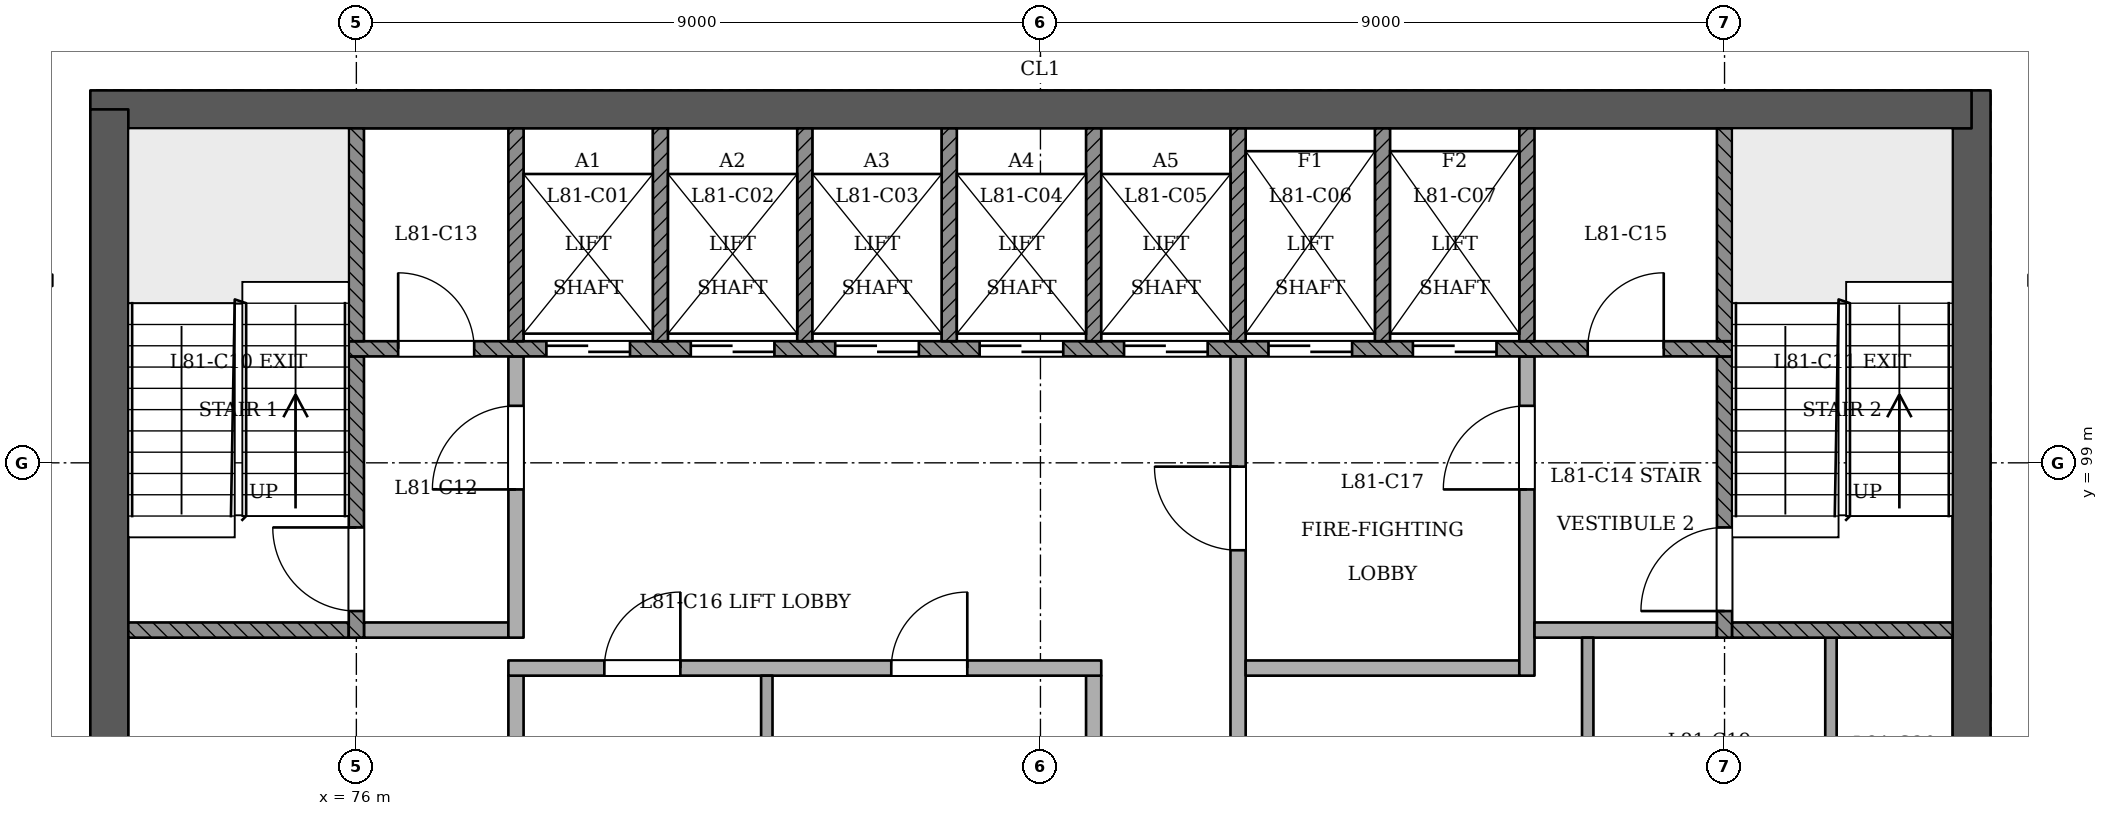
"""IFC4 building model, lengths in metres.
Left out: names, types, materials, properties, quantities, classifications, styles, units other than length and angle.
Written with IfcOpenShell. Run it as: python <this file> out.ifc"""

import sys

from ifc_helpers import new_model, si_unit, direction, frame, frame_2d, origin, place, context, subcontext, project, spatial, rectangle, extrude, element, fill, save


model = new_model("IFC4")
c1 = context("Model", 3, precision=1e-05, world=origin(), true_north=direction((0.0, 1.0)))
c2 = subcontext(c1, "Body", "Model", "MODEL_VIEW")
j1 = project(units=[si_unit("LENGTHUNIT", "METRE"), si_unit("PLANEANGLEUNIT", "RADIAN")], contexts=[c1])
p1 = place(None, origin())
s1 = spatial("IfcSite", under=j1, at=p1, CompositionType="ELEMENT")
p2 = place(p1, origin())
s2 = spatial("IfcBuilding", under=s1, at=p2, CompositionType="ELEMENT")
p3 = place(p2, frame((0.0, 0.0, 313.0)))
s3 = spatial("IfcBuildingStorey", under=s2, at=p3, CompositionType="ELEMENT", Elevation=313.0)
p4 = place(p3, frame((97.25, 93.15, 0.0), z_axis=(0.0, 0.0, 1.0), x_axis=(0.0, 1.0, 0.0)))
e1 = element("IfcWall", 1, at=p4, inside=s3, PredefinedType="SHEAR", context=c2, shape_type="SweptSolid", body=[
    extrude(rectangle(XDim=10.75, YDim=0.5, at=frame_2d((5.375, 0.0))), origin(), (0.0, 0.0, 1.0), 3.6),
])
p5 = place(p3, frame((97.25, 103.65, 0.0), z_axis=(0.0, 0.0, 1.0), x_axis=(-1.0, 0.0, 0.0)))
e2 = element("IfcWall", 2, at=p5, inside=s3, PredefinedType="SHEAR", context=c2, shape_type="SweptSolid", body=[
    extrude(rectangle(XDim=24.75, YDim=0.5, at=frame_2d((12.375, 0.0))), origin(), (0.0, 0.0, 1.0), 3.6),
])
p6 = place(p3, frame((72.75, 103.65, 0.0), z_axis=(0.0, 0.0, 1.0), x_axis=(0.0, -1.0, 0.0)))
e3 = element("IfcWall", 3, at=p6, inside=s3, PredefinedType="SHEAR", context=c2, shape_type="SweptSolid", body=[
    extrude(rectangle(XDim=10.75, YDim=0.5, at=frame_2d((5.375, 0.0))), origin(), (0.0, 0.0, 1.0), 3.6),
])
p7 = place(p3, frame((78.1, 93.4, 0.0), z_axis=(0.0, 0.0, 1.0), x_axis=(0.0, 1.0, 0.0)))
e4 = element("IfcWall", 4, at=p7, inside=s3, PredefinedType="PARTITIONING", context=c2, shape_type="SweptSolid", body=[
    extrude(rectangle(XDim=2.8, YDim=0.2, at=frame_2d((1.4, 0.0))), origin(), (0.0, 0.0, 1.0), 3.2),
])
p8 = place(p3, frame((81.4, 93.4, 0.0), z_axis=(0.0, 0.0, 1.0), x_axis=(0.0, 1.0, 0.0)))
e5 = element("IfcWall", 5, at=p8, inside=s3, PredefinedType="PARTITIONING", context=c2, shape_type="SweptSolid", body=[
    extrude(rectangle(XDim=2.8, YDim=0.15, at=frame_2d((1.4, 0.0))), origin(), (0.0, 0.0, 1.0), 3.2),
])
p9 = place(p3, frame((85.7, 93.4, 0.0), z_axis=(0.0, 0.0, 1.0), x_axis=(0.0, 1.0, 0.0)))
e6 = element("IfcWall", 6, at=p9, inside=s3, PredefinedType="PARTITIONING", context=c2, shape_type="SweptSolid", body=[
    extrude(rectangle(XDim=2.8, YDim=0.2, at=frame_2d((1.4, 0.0))), origin(), (0.0, 0.0, 1.0), 3.2),
])
p10 = place(p3, frame((87.6, 93.4, 0.0), z_axis=(0.0, 0.0, 1.0), x_axis=(0.0, 1.0, 0.0)))
e7 = element("IfcWall", 7, at=p10, inside=s3, PredefinedType="PARTITIONING", context=c2, shape_type="SweptSolid", body=[
    extrude(rectangle(XDim=7.0, YDim=0.2, at=frame_2d((3.5, 0.0))), origin(), (0.0, 0.0, 1.0), 3.2),
])
p11 = place(p10, frame((4.45, 0.0, 0.0)))
e8 = element("IfcOpeningElement", 8, at=p11, cuts=e7, PredefinedType="OPENING", context=c2, shape_type="SweptSolid", body=[
    extrude(rectangle(XDim=1.1, YDim=2.1, at=frame_2d((0.55, 1.05))), frame((0.0, 0.11, 0.0), z_axis=(0.0, -1.0, 0.0), x_axis=(1.0, 0.0, 0.0)), (0.0, 0.0, 1.0), 0.221),
])
for number, where, z_axis, x_axis in (
    (9, (92.2, 93.4, 0.0), (0.0, 0.0, 1.0), (0.0, 1.0, 0.0)),
    (10, (95.4, 93.4, 0.0), (0.0, 0.0, 1.0), (0.0, 1.0, 0.0)),
):
    element("IfcWall", number, at=place(p3, frame(where, z_axis=z_axis, x_axis=x_axis)), inside=s3, PredefinedType="PARTITIONING", context=c2, shape_type="SweptSolid", body=[
        extrude(rectangle(XDim=3.3, YDim=0.15, at=frame_2d((1.65, 0.0))), origin(), (0.0, 0.0, 1.0), 3.2),
    ])
p12 = place(p3, frame((78.0, 96.3, 0.0), z_axis=(0.0, 0.0, 1.0), x_axis=(1.0, 0.0, 0.0)))
e11 = element("IfcWall", 11, at=p12, inside=s3, PredefinedType="PARTITIONING", context=c2, shape_type="SweptSolid", body=[
    extrude(rectangle(XDim=7.8, YDim=0.2, at=frame_2d((3.9, 0.0))), origin(), (0.0, 0.0, 1.0), 3.2),
])
p13 = place(p12, frame((1.262, 0.0, 0.0)))
e12 = element("IfcOpeningElement", 12, at=p13, cuts=e11, PredefinedType="OPENING", context=c2, shape_type="SweptSolid", body=[
    extrude(rectangle(XDim=1.0, YDim=2.1, at=frame_2d((0.5, 1.05))), frame((0.0, 0.11, 0.0), z_axis=(0.0, -1.0, 0.0), x_axis=(1.0, 0.0, 0.0)), (0.0, 0.0, 1.0), 0.221),
])
p14 = place(p12, frame((5.038, 0.0, 0.0)))
e13 = element("IfcOpeningElement", 13, at=p14, cuts=e11, PredefinedType="OPENING", context=c2, shape_type="SweptSolid", body=[
    extrude(rectangle(XDim=1.0, YDim=2.1, at=frame_2d((0.5, 1.05))), frame((0.0, 0.11, 0.0), z_axis=(0.0, -1.0, 0.0), x_axis=(1.0, 0.0, 0.0)), (0.0, 0.0, 1.0), 0.221),
])
p15 = place(p3, frame((87.7, 96.3, 0.0), z_axis=(0.0, 0.0, 1.0), x_axis=(1.0, 0.0, 0.0)))
e14 = element("IfcWall", 14, at=p15, inside=s3, PredefinedType="PARTITIONING", context=c2, shape_type="SweptSolid", body=[
    extrude(rectangle(XDim=3.6, YDim=0.2, at=frame_2d((1.8, 0.0))), origin(), (0.0, 0.0, 1.0), 3.2),
])
p16 = place(p3, frame((91.4, 96.2, 0.0), z_axis=(0.0, 0.0, 1.0), x_axis=(0.0, 1.0, 0.0)))
e15 = element("IfcWall", 15, at=p16, inside=s3, PredefinedType="PARTITIONING", context=c2, shape_type="SweptSolid", body=[
    extrude(rectangle(XDim=4.2, YDim=0.2, at=frame_2d((2.1, 0.0))), origin(), (0.0, 0.0, 1.0), 3.2),
])
p17 = place(p16, frame((2.45, 0.0, 0.0)))
e16 = element("IfcOpeningElement", 16, at=p17, cuts=e15, PredefinedType="OPENING", context=c2, shape_type="SweptSolid", body=[
    extrude(rectangle(XDim=1.1, YDim=2.1, at=frame_2d((0.55, 1.05))), frame((0.0, 0.11, 0.0), z_axis=(0.0, -1.0, 0.0), x_axis=(1.0, 0.0, 0.0)), (0.0, 0.0, 1.0), 0.221),
])
p18 = place(p3, frame((73.0, 96.8, 0.0), z_axis=(0.0, 0.0, 1.0), x_axis=(1.0, 0.0, 0.0)))
e17 = element("IfcWall", 17, at=p18, inside=s3, PredefinedType="SOLIDWALL", context=c2, shape_type="SweptSolid", body=[
    extrude(rectangle(XDim=2.9, YDim=0.2, at=frame_2d((1.45, 0.0))), origin(), (0.0, 0.0, 1.0), 3.2),
])
p19 = place(p3, frame((76.0, 96.7, 0.0), z_axis=(0.0, 0.0, 1.0), x_axis=(0.0, 1.0, 0.0)))
e18 = element("IfcWall", 18, at=p19, inside=s3, PredefinedType="SOLIDWALL", context=c2, shape_type="SweptSolid", body=[
    extrude(rectangle(XDim=3.7, YDim=0.2, at=frame_2d((1.85, 0.0))), origin(), (0.0, 0.0, 1.0), 3.2),
])
p20 = place(p19, frame((0.35, 0.0, 0.0)))
e19 = element("IfcOpeningElement", 19, at=p20, cuts=e18, PredefinedType="OPENING", context=c2, shape_type="SweptSolid", body=[
    extrude(rectangle(XDim=1.1, YDim=2.1, at=frame_2d((0.55, 1.05))), frame((0.0, 0.11, 0.0), z_axis=(0.0, -1.0, 0.0), x_axis=(1.0, 0.0, 0.0)), (0.0, 0.0, 1.0), 0.221),
])
p21 = place(p3, frame((76.1, 96.8, 0.0), z_axis=(0.0, 0.0, 1.0), x_axis=(1.0, 0.0, 0.0)))
e20 = element("IfcWall", 20, at=p21, inside=s3, PredefinedType="PARTITIONING", context=c2, shape_type="SweptSolid", body=[
    extrude(rectangle(XDim=1.9, YDim=0.2, at=frame_2d((0.95, 0.0))), origin(), (0.0, 0.0, 1.0), 3.2),
])
p22 = place(p3, frame((78.1, 96.7, 0.0), z_axis=(0.0, 0.0, 1.0), x_axis=(0.0, 1.0, 0.0)))
e21 = element("IfcWall", 21, at=p22, inside=s3, PredefinedType="PARTITIONING", context=c2, shape_type="SweptSolid", body=[
    extrude(rectangle(XDim=3.7, YDim=0.2, at=frame_2d((1.85, 0.0))), origin(), (0.0, 0.0, 1.0), 3.2),
])
p23 = place(p22, frame((1.95, 0.0, 0.0)))
e22 = element("IfcOpeningElement", 22, at=p23, cuts=e21, PredefinedType="OPENING", context=c2, shape_type="SweptSolid", body=[
    extrude(rectangle(XDim=1.1, YDim=2.1, at=frame_2d((0.55, 1.05))), frame((0.0, 0.11, 0.0), z_axis=(0.0, -1.0, 0.0), x_axis=(1.0, 0.0, 0.0)), (0.0, 0.0, 1.0), 0.221),
])
p24 = place(p3, frame((91.5, 96.8, 0.0), z_axis=(0.0, 0.0, 1.0), x_axis=(1.0, 0.0, 0.0)))
e23 = element("IfcWall", 23, at=p24, inside=s3, PredefinedType="PARTITIONING", context=c2, shape_type="SweptSolid", body=[
    extrude(rectangle(XDim=2.4, YDim=0.2, at=frame_2d((1.2, 0.0))), origin(), (0.0, 0.0, 1.0), 3.2),
])
p25 = place(p3, frame((94.0, 96.7, 0.0), z_axis=(0.0, 0.0, 1.0), x_axis=(0.0, 1.0, 0.0)))
e24 = element("IfcWall", 24, at=p25, inside=s3, PredefinedType="SOLIDWALL", context=c2, shape_type="SweptSolid", body=[
    extrude(rectangle(XDim=3.7, YDim=0.2, at=frame_2d((1.85, 0.0))), origin(), (0.0, 0.0, 1.0), 3.2),
])
p26 = place(p25, frame((0.35, 0.0, 0.0)))
e25 = element("IfcOpeningElement", 25, at=p26, cuts=e24, PredefinedType="OPENING", context=c2, shape_type="SweptSolid", body=[
    extrude(rectangle(XDim=1.1, YDim=2.1, at=frame_2d((0.55, 1.05))), frame((0.0, 0.11, 0.0), z_axis=(0.0, -1.0, 0.0), x_axis=(1.0, 0.0, 0.0)), (0.0, 0.0, 1.0), 0.221),
])
p27 = place(p3, frame((94.1, 96.8, 0.0), z_axis=(0.0, 0.0, 1.0), x_axis=(1.0, 0.0, 0.0)))
e26 = element("IfcWall", 26, at=p27, inside=s3, PredefinedType="SOLIDWALL", context=c2, shape_type="SweptSolid", body=[
    extrude(rectangle(XDim=2.9, YDim=0.2, at=frame_2d((1.45, 0.0))), origin(), (0.0, 0.0, 1.0), 3.2),
])
p28 = place(p3, frame((75.9, 100.5, 0.0), z_axis=(0.0, 0.0, 1.0), x_axis=(1.0, 0.0, 0.0)))
e27 = element("IfcWall", 27, at=p28, inside=s3, PredefinedType="SOLIDWALL", context=c2, shape_type="SweptSolid", body=[
    extrude(rectangle(XDim=18.2, YDim=0.2, at=frame_2d((9.1, 0.0))), origin(), (0.0, 0.0, 1.0), 3.2),
])
p29 = place(p28, frame((2.6, 0.0, 0.0)))
e28 = element("IfcOpeningElement", 28, at=p29, cuts=e27, PredefinedType="OPENING", context=c2, shape_type="SweptSolid", body=[
    extrude(rectangle(XDim=1.1, YDim=2.1, at=frame_2d((0.55, 1.05))), frame((0.0, 0.11, 0.0), z_axis=(0.0, -1.0, 0.0), x_axis=(1.0, 0.0, 0.0)), (0.0, 0.0, 1.0), 0.221),
])
p30 = place(p28, frame((4.5, 0.0, 0.0)))
e29 = element("IfcOpeningElement", 29, at=p30, cuts=e27, PredefinedType="OPENING", context=c2, shape_type="SweptSolid", body=[
    extrude(rectangle(XDim=1.1, YDim=2.1, at=frame_2d((0.55, 1.05))), frame((0.0, 0.11, 0.0), z_axis=(0.0, -1.0, 0.0), x_axis=(1.0, 0.0, 0.0)), (0.0, 0.0, 1.0), 0.221),
])
p31 = place(p28, frame((6.4, 0.0, 0.0)))
e30 = element("IfcOpeningElement", 30, at=p31, cuts=e27, PredefinedType="OPENING", context=c2, shape_type="SweptSolid", body=[
    extrude(rectangle(XDim=1.1, YDim=2.1, at=frame_2d((0.55, 1.05))), frame((0.0, 0.11, 0.0), z_axis=(0.0, -1.0, 0.0), x_axis=(1.0, 0.0, 0.0)), (0.0, 0.0, 1.0), 0.221),
])
p32 = place(p28, frame((8.3, 0.0, 0.0)))
e31 = element("IfcOpeningElement", 31, at=p32, cuts=e27, PredefinedType="OPENING", context=c2, shape_type="SweptSolid", body=[
    extrude(rectangle(XDim=1.1, YDim=2.1, at=frame_2d((0.55, 1.05))), frame((0.0, 0.11, 0.0), z_axis=(0.0, -1.0, 0.0), x_axis=(1.0, 0.0, 0.0)), (0.0, 0.0, 1.0), 0.221),
])
p33 = place(p28, frame((10.2, 0.0, 0.0)))
e32 = element("IfcOpeningElement", 32, at=p33, cuts=e27, PredefinedType="OPENING", context=c2, shape_type="SweptSolid", body=[
    extrude(rectangle(XDim=1.1, YDim=2.1, at=frame_2d((0.55, 1.05))), frame((0.0, 0.11, 0.0), z_axis=(0.0, -1.0, 0.0), x_axis=(1.0, 0.0, 0.0)), (0.0, 0.0, 1.0), 0.221),
])
p34 = place(p28, frame((12.1, 0.0, 0.0)))
e33 = element("IfcOpeningElement", 33, at=p34, cuts=e27, PredefinedType="OPENING", context=c2, shape_type="SweptSolid", body=[
    extrude(rectangle(XDim=1.1, YDim=2.1, at=frame_2d((0.55, 1.05))), frame((0.0, 0.11, 0.0), z_axis=(0.0, -1.0, 0.0), x_axis=(1.0, 0.0, 0.0)), (0.0, 0.0, 1.0), 0.221),
])
p35 = place(p28, frame((14.0, 0.0, 0.0)))
e34 = element("IfcOpeningElement", 34, at=p35, cuts=e27, PredefinedType="OPENING", context=c2, shape_type="SweptSolid", body=[
    extrude(rectangle(XDim=1.1, YDim=2.1, at=frame_2d((0.55, 1.05))), frame((0.0, 0.11, 0.0), z_axis=(0.0, -1.0, 0.0), x_axis=(1.0, 0.0, 0.0)), (0.0, 0.0, 1.0), 0.221),
])
p36 = place(p28, frame((0.65, 0.0, 0.0)))
e35 = element("IfcOpeningElement", 35, at=p36, cuts=e27, PredefinedType="OPENING", context=c2, shape_type="SweptSolid", body=[
    extrude(rectangle(XDim=1.0, YDim=2.1, at=frame_2d((0.5, 1.05))), frame((0.0, 0.11, 0.0), z_axis=(0.0, -1.0, 0.0), x_axis=(1.0, 0.0, 0.0)), (0.0, 0.0, 1.0), 0.221),
])
p37 = place(p28, frame((16.3, 0.0, 0.0)))
e36 = element("IfcOpeningElement", 36, at=p37, cuts=e27, PredefinedType="OPENING", context=c2, shape_type="SweptSolid", body=[
    extrude(rectangle(XDim=1.0, YDim=2.1, at=frame_2d((0.5, 1.05))), frame((0.0, 0.11, 0.0), z_axis=(0.0, -1.0, 0.0), x_axis=(1.0, 0.0, 0.0)), (0.0, 0.0, 1.0), 0.221),
])
for number, where, z_axis, x_axis in (
    (37, (76.0, 100.6, 0.0), (0.0, 0.0, 1.0), (0.0, 1.0, 0.0)),
    (38, (78.1, 100.6, 0.0), (0.0, 0.0, 1.0), (0.0, 1.0, 0.0)),
    (39, (80.0, 100.6, 0.0), (0.0, 0.0, 1.0), (0.0, 1.0, 0.0)),
    (40, (81.9, 100.6, 0.0), (0.0, 0.0, 1.0), (0.0, 1.0, 0.0)),
    (41, (83.8, 100.6, 0.0), (0.0, 0.0, 1.0), (0.0, 1.0, 0.0)),
    (42, (85.7, 100.6, 0.0), (0.0, 0.0, 1.0), (0.0, 1.0, 0.0)),
    (43, (87.6, 100.6, 0.0), (0.0, 0.0, 1.0), (0.0, 1.0, 0.0)),
    (44, (89.5, 100.6, 0.0), (0.0, 0.0, 1.0), (0.0, 1.0, 0.0)),
    (45, (91.4, 100.6, 0.0), (0.0, 0.0, 1.0), (0.0, 1.0, 0.0)),
    (46, (94.0, 100.6, 0.0), (0.0, 0.0, 1.0), (0.0, 1.0, 0.0)),
):
    element("IfcWall", number, at=place(p3, frame(where, z_axis=z_axis, x_axis=x_axis)), inside=s3, PredefinedType="SOLIDWALL", context=c2, shape_type="SweptSolid", body=[
        extrude(rectangle(XDim=2.8, YDim=0.2, at=frame_2d((1.4, 0.0))), origin(), (0.0, 0.0, 1.0), 3.2),
    ])
p38 = place(p29, origin())
e47 = element("IfcDoor", 47, at=p38, inside=s3, OperationType="SLIDING_TO_RIGHT", PredefinedType="NOTDEFINED", context=c2, shape_type="SweptSolid", body=[
    extrude(rectangle(XDim=1.1, YDim=2.1, at=frame_2d((0.55, 1.05))), frame((0.0, 0.025, 0.0), z_axis=(0.0, -1.0, 0.0), x_axis=(1.0, 0.0, 0.0)), (0.0, 0.0, 1.0), 0.05),
])
fill(e28, e47)
p39 = place(p30, origin())
e48 = element("IfcDoor", 48, at=p39, inside=s3, OperationType="SLIDING_TO_LEFT", PredefinedType="NOTDEFINED", context=c2, shape_type="SweptSolid", body=[
    extrude(rectangle(XDim=1.1, YDim=2.1, at=frame_2d((0.55, 1.05))), frame((0.0, 0.025, 0.0), z_axis=(0.0, -1.0, 0.0), x_axis=(1.0, 0.0, 0.0)), (0.0, 0.0, 1.0), 0.05),
])
fill(e29, e48)
p40 = place(p31, origin())
e49 = element("IfcDoor", 49, at=p40, inside=s3, OperationType="SLIDING_TO_RIGHT", PredefinedType="NOTDEFINED", context=c2, shape_type="SweptSolid", body=[
    extrude(rectangle(XDim=1.1, YDim=2.1, at=frame_2d((0.55, 1.05))), frame((0.0, 0.025, 0.0), z_axis=(0.0, -1.0, 0.0), x_axis=(1.0, 0.0, 0.0)), (0.0, 0.0, 1.0), 0.05),
])
fill(e30, e49)
p41 = place(p32, origin())
e50 = element("IfcDoor", 50, at=p41, inside=s3, OperationType="SLIDING_TO_LEFT", PredefinedType="NOTDEFINED", context=c2, shape_type="SweptSolid", body=[
    extrude(rectangle(XDim=1.1, YDim=2.1, at=frame_2d((0.55, 1.05))), frame((0.0, 0.025, 0.0), z_axis=(0.0, -1.0, 0.0), x_axis=(1.0, 0.0, 0.0)), (0.0, 0.0, 1.0), 0.05),
])
fill(e31, e50)
p42 = place(p33, origin())
e51 = element("IfcDoor", 51, at=p42, inside=s3, OperationType="SLIDING_TO_RIGHT", PredefinedType="NOTDEFINED", context=c2, shape_type="SweptSolid", body=[
    extrude(rectangle(XDim=1.1, YDim=2.1, at=frame_2d((0.55, 1.05))), frame((0.0, 0.025, 0.0), z_axis=(0.0, -1.0, 0.0), x_axis=(1.0, 0.0, 0.0)), (0.0, 0.0, 1.0), 0.05),
])
fill(e32, e51)
p43 = place(p34, origin())
e52 = element("IfcDoor", 52, at=p43, inside=s3, OperationType="SLIDING_TO_RIGHT", PredefinedType="NOTDEFINED", context=c2, shape_type="SweptSolid", body=[
    extrude(rectangle(XDim=1.1, YDim=2.1, at=frame_2d((0.55, 1.05))), frame((0.0, 0.025, 0.0), z_axis=(0.0, -1.0, 0.0), x_axis=(1.0, 0.0, 0.0)), (0.0, 0.0, 1.0), 0.05),
])
fill(e33, e52)
p44 = place(p35, origin())
e53 = element("IfcDoor", 53, at=p44, inside=s3, OperationType="SLIDING_TO_LEFT", PredefinedType="NOTDEFINED", context=c2, shape_type="SweptSolid", body=[
    extrude(rectangle(XDim=1.1, YDim=2.1, at=frame_2d((0.55, 1.05))), frame((0.0, 0.025, 0.0), z_axis=(0.0, -1.0, 0.0), x_axis=(1.0, 0.0, 0.0)), (0.0, 0.0, 1.0), 0.05),
])
fill(e34, e53)
p45 = place(p20, origin())
e54 = element("IfcDoor", 54, at=p45, inside=s3, OperationType="SINGLE_SWING_RIGHT", PredefinedType="NOTDEFINED", context=c2, shape_type="SweptSolid", body=[
    extrude(rectangle(XDim=1.1, YDim=2.1, at=frame_2d((0.55, 1.05))), frame((0.0, 0.025, 0.0), z_axis=(0.0, -1.0, 0.0), x_axis=(1.0, 0.0, 0.0)), (0.0, 0.0, 1.0), 0.05),
])
fill(e19, e54)
p46 = place(p26, origin())
e55 = element("IfcDoor", 55, at=p46, inside=s3, OperationType="SINGLE_SWING_LEFT", PredefinedType="NOTDEFINED", context=c2, shape_type="SweptSolid", body=[
    extrude(rectangle(XDim=1.1, YDim=2.1, at=frame_2d((0.55, 1.05))), frame((0.0, 0.025, 0.0), z_axis=(0.0, -1.0, 0.0), x_axis=(1.0, 0.0, 0.0)), (0.0, 0.0, 1.0), 0.05),
])
fill(e25, e55)
p47 = place(p23, origin())
e56 = element("IfcDoor", 56, at=p47, inside=s3, OperationType="SINGLE_SWING_LEFT", PredefinedType="NOTDEFINED", context=c2, shape_type="SweptSolid", body=[
    extrude(rectangle(XDim=1.1, YDim=2.1, at=frame_2d((0.55, 1.05))), frame((0.0, 0.025, 0.0), z_axis=(0.0, -1.0, 0.0), x_axis=(1.0, 0.0, 0.0)), (0.0, 0.0, 1.0), 0.05),
])
fill(e22, e56)
p48 = place(p11, origin())
e57 = element("IfcDoor", 57, at=p48, inside=s3, OperationType="SINGLE_SWING_RIGHT", PredefinedType="NOTDEFINED", context=c2, shape_type="SweptSolid", body=[
    extrude(rectangle(XDim=1.1, YDim=2.1, at=frame_2d((0.55, 1.05))), frame((0.0, 0.025, 0.0), z_axis=(0.0, -1.0, 0.0), x_axis=(1.0, 0.0, 0.0)), (0.0, 0.0, 1.0), 0.05),
])
fill(e8, e57)
p49 = place(p17, origin())
e58 = element("IfcDoor", 58, at=p49, inside=s3, OperationType="SINGLE_SWING_LEFT", PredefinedType="NOTDEFINED", context=c2, shape_type="SweptSolid", body=[
    extrude(rectangle(XDim=1.1, YDim=2.1, at=frame_2d((0.55, 1.05))), frame((0.0, 0.025, 0.0), z_axis=(0.0, -1.0, 0.0), x_axis=(1.0, 0.0, 0.0)), (0.0, 0.0, 1.0), 0.05),
])
fill(e16, e58)
p50 = place(p36, origin())
e59 = element("IfcDoor", 59, at=p50, inside=s3, OperationType="SINGLE_SWING_LEFT", PredefinedType="NOTDEFINED", context=c2, shape_type="SweptSolid", body=[
    extrude(rectangle(XDim=1.0, YDim=2.1, at=frame_2d((0.5, 1.05))), frame((0.0, 0.025, 0.0), z_axis=(0.0, -1.0, 0.0), x_axis=(1.0, 0.0, 0.0)), (0.0, 0.0, 1.0), 0.05),
])
fill(e35, e59)
p51 = place(p37, origin())
e60 = element("IfcDoor", 60, at=p51, inside=s3, OperationType="SINGLE_SWING_RIGHT", PredefinedType="NOTDEFINED", context=c2, shape_type="SweptSolid", body=[
    extrude(rectangle(XDim=1.0, YDim=2.1, at=frame_2d((0.5, 1.05))), frame((0.0, 0.025, 0.0), z_axis=(0.0, -1.0, 0.0), x_axis=(1.0, 0.0, 0.0)), (0.0, 0.0, 1.0), 0.05),
])
fill(e36, e60)
p52 = place(p13, origin())
e61 = element("IfcDoor", 61, at=p52, inside=s3, OperationType="SINGLE_SWING_RIGHT", PredefinedType="NOTDEFINED", context=c2, shape_type="SweptSolid", body=[
    extrude(rectangle(XDim=1.0, YDim=2.1, at=frame_2d((0.5, 1.05))), frame((0.0, 0.025, 0.0), z_axis=(0.0, -1.0, 0.0), x_axis=(1.0, 0.0, 0.0)), (0.0, 0.0, 1.0), 0.05),
])
fill(e12, e61)
p53 = place(p14, origin())
e62 = element("IfcDoor", 62, at=p53, inside=s3, OperationType="SINGLE_SWING_RIGHT", PredefinedType="NOTDEFINED", context=c2, shape_type="SweptSolid", body=[
    extrude(rectangle(XDim=1.0, YDim=2.1, at=frame_2d((0.5, 1.05))), frame((0.0, 0.025, 0.0), z_axis=(0.0, -1.0, 0.0), x_axis=(1.0, 0.0, 0.0)), (0.0, 0.0, 1.0), 0.05),
])
fill(e13, e62)
save(model, sys.argv[1])
